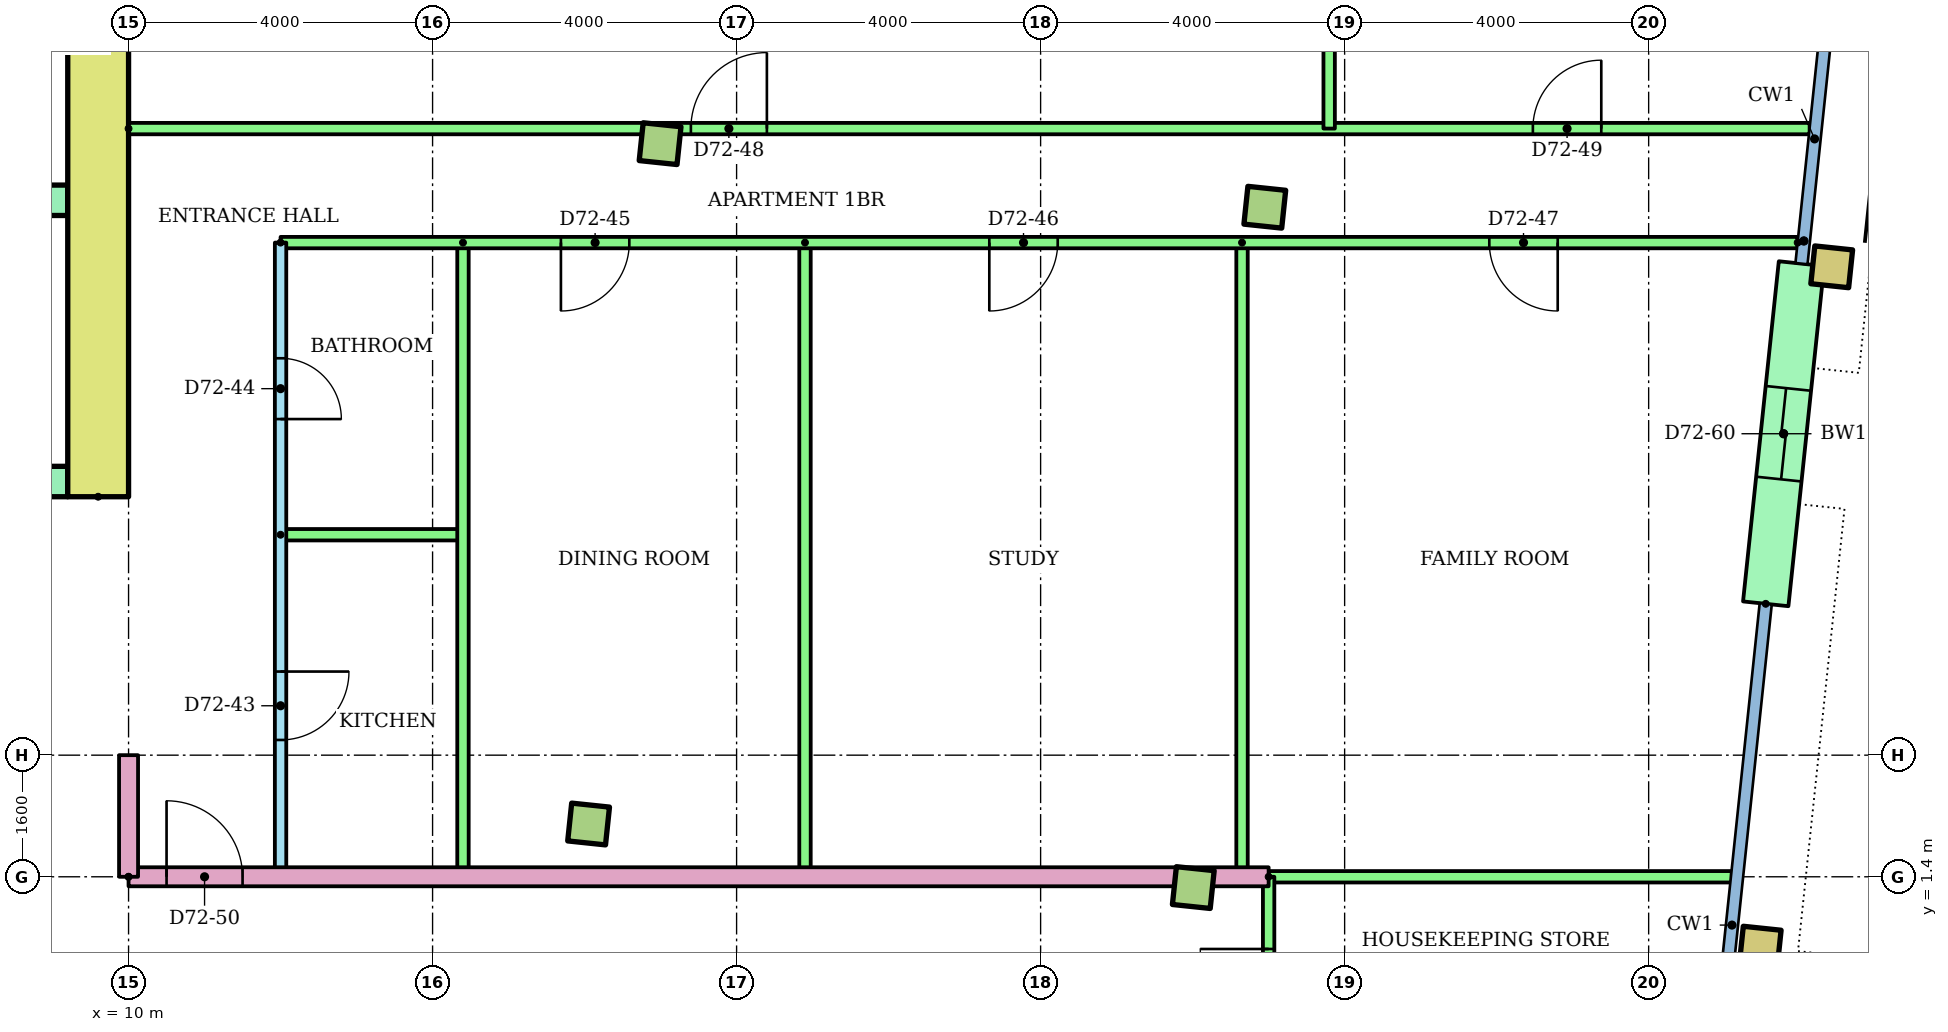
"""IFC4 building model, lengths in metres.
Left out: names, types, materials, properties, quantities, classifications, styles, units other than length and angle.
Written with IfcOpenShell. Run it as: python <this file> out.ifc"""

import sys

from ifc_helpers import new_model, si_unit, direction, frame, frame_2d, origin, origin_2d, place, context, subcontext, project, spatial, rectangle, hollow_rectangle, extrude, element, fill, save


model = new_model("IFC4")
c1 = context("Model", 3, precision=1e-05, world=origin(), true_north=direction((0.0, 1.0)))
c2 = subcontext(c1, "Body", "Model", "MODEL_VIEW")
j1 = project(units=[si_unit("LENGTHUNIT", "METRE"), si_unit("PLANEANGLEUNIT", "RADIAN")], contexts=[c1])
p1 = place(None, origin())
s1 = spatial("IfcSite", under=j1, at=p1, CompositionType="ELEMENT")
p2 = place(p1, origin())
s2 = spatial("IfcBuilding", under=s1, at=p2, CompositionType="ELEMENT")
p3 = place(p2, frame((0.0, 0.0, 275.5)))
s3 = spatial("IfcBuildingStorey", under=s2, at=p3, CompositionType="ELEMENT", Elevation=275.5)
for number, where, z_axis, x_axis in (
    (1, (16.053, 2.094, 0.0), (0.0, 0.0, 1.0), (0.995, -0.105, 0.0)),
    (2, (24.009, 1.258, 0.0), (0.0, 0.0, 1.0), (0.995, -0.105, 0.0)),
):
    element("IfcColumn", number, at=place(p3, frame(where, z_axis=z_axis, x_axis=x_axis)), inside=s3, PredefinedType="COLUMN", context=c2, shape_type="SweptSolid", body=[
        extrude(rectangle(XDim=0.5, YDim=0.5, at=origin_2d()), origin(), (0.0, 0.0, 1.0), 3.2),
    ])
p4 = place(p3, frame((31.468, 0.474, 0.0), z_axis=(0.0, 0.0, 1.0), x_axis=(0.994521895368, -0.104528463268, 0.0)))
e3 = element("IfcColumn", 3, at=p4, inside=s3, PredefinedType="COLUMN", context=c2, shape_type="SweptSolid", body=[
    extrude(hollow_rectangle(XDim=0.5, YDim=0.5, WallThickness=0.025, at=origin_2d()), origin(), (0.0, 0.0, 1.0), 3.2),
])
for number, where, z_axis, x_axis in (
    (4, (16.993, 11.045, 0.0), (0.0, 0.0, 1.0), (0.995, -0.105, 0.0)),
    (5, (24.95, 10.209, 0.0), (0.0, 0.0, 1.0), (0.995, -0.105, 0.0)),
):
    element("IfcColumn", number, at=place(p3, frame(where, z_axis=z_axis, x_axis=x_axis)), inside=s3, PredefinedType="COLUMN", context=c2, shape_type="SweptSolid", body=[
        extrude(rectangle(XDim=0.5, YDim=0.5, at=origin_2d()), origin(), (0.0, 0.0, 1.0), 3.2),
    ])
p5 = place(p3, frame((32.409, 9.425, 0.0), z_axis=(0.0, 0.0, 1.0), x_axis=(0.994521895368, -0.104528463268, 0.0)))
e6 = element("IfcColumn", 6, at=p5, inside=s3, PredefinedType="COLUMN", context=c2, shape_type="SweptSolid", body=[
    extrude(hollow_rectangle(XDim=0.5, YDim=0.5, WallThickness=0.025, at=origin_2d()), origin(), (0.0, 0.0, 1.0), 3.2),
])
p6 = place(p3, frame((31.54, 4.991, 0.0), z_axis=(0.0, 0.0, 1.0), x_axis=(0.104546400045, 0.994520009974, 0.0)))
e7 = element("IfcWall", 7, at=p6, inside=s3, PredefinedType="STANDARD", context=c2, shape_type="SweptSolid", body=[
    extrude(rectangle(XDim=4.5, YDim=0.6, at=frame_2d((2.25, 0.0))), origin(), (0.0, 0.0, 1.0), 2.92),
])
p7 = place(p6, frame((1.65, 0.0, 0.0)))
e8 = element("IfcOpeningElement", 8, at=p7, cuts=e7, PredefinedType="OPENING", context=c2, shape_type="SweptSolid", body=[
    extrude(rectangle(XDim=1.2, YDim=2.1, at=frame_2d((0.6, 1.05))), frame((0.0, 0.31, 0.0), z_axis=(0.0, -1.0, 0.0), x_axis=(1.0, 0.0, 0.0)), (0.0, 0.0, 1.0), 0.62),
])
p8 = place(p3, frame((9.6, 6.4, 0.0), z_axis=(0.0, 0.0, 1.0), x_axis=(0.0, 1.0, 0.0)))
e9 = element("IfcWall", 9, at=p8, inside=s3, PredefinedType="SHEAR", context=c2, shape_type="SweptSolid", body=[
    extrude(rectangle(XDim=13.6, YDim=0.8, at=frame_2d((6.8, 0.0))), origin(), (0.0, 0.0, 1.0), 2.92),
])
p9 = place(p3, frame((-9.2, 6.6, 0.0)))
e10 = element("IfcWall", 10, at=p9, inside=s3, PredefinedType="SHEAR", context=c2, shape_type="SweptSolid", body=[
    extrude(rectangle(XDim=18.4, YDim=0.4, at=frame_2d((9.2, 0.0))), origin(), (0.0, 0.0, 1.0), 2.92),
])
p10 = place(p9, frame((8.3, 0.0, 0.0)))
e11 = element("IfcOpeningElement", 11, at=p10, cuts=e10, PredefinedType="OPENING", context=c2, shape_type="SweptSolid", body=[
    extrude(rectangle(XDim=1.8, YDim=2.1, at=frame_2d((0.9, 1.05))), frame((0.0, 0.21, 0.0), z_axis=(0.0, -1.0, 0.0), x_axis=(1.0, 0.0, 0.0)), (0.0, 0.0, 1.0), 0.42),
])
p11 = place(p9, frame((3.8, 0.0, 0.0)))
e12 = element("IfcOpeningElement", 12, at=p11, cuts=e10, PredefinedType="OPENING", context=c2, shape_type="SweptSolid", body=[
    extrude(rectangle(XDim=1.8, YDim=2.1, at=frame_2d((0.9, 1.05))), frame((0.0, 0.21, 0.0), z_axis=(0.0, -1.0, 0.0), x_axis=(1.0, 0.0, 0.0)), (0.0, 0.0, 1.0), 0.42),
])
p12 = place(p9, frame((12.8, 0.0, 0.0)))
e13 = element("IfcOpeningElement", 13, at=p12, cuts=e10, PredefinedType="OPENING", context=c2, shape_type="SweptSolid", body=[
    extrude(rectangle(XDim=1.8, YDim=2.1, at=frame_2d((0.9, 1.05))), frame((0.0, 0.21, 0.0), z_axis=(0.0, -1.0, 0.0), x_axis=(1.0, 0.0, 0.0)), (0.0, 0.0, 1.0), 0.42),
])
p13 = place(p3, frame((1.2, 10.3, 0.0)))
e14 = element("IfcWall", 14, at=p13, inside=s3, PredefinedType="SHEAR", context=c2, shape_type="SweptSolid", body=[
    extrude(rectangle(XDim=8.0, YDim=0.4, at=frame_2d((4.0, 0.0))), origin(), (0.0, 0.0, 1.0), 2.92),
])
p14 = place(p13, frame((0.817, 0.0, 0.0)))
e15 = element("IfcOpeningElement", 15, at=p14, cuts=e14, PredefinedType="OPENING", context=c2, shape_type="SweptSolid", body=[
    extrude(rectangle(XDim=1.1, YDim=2.1, at=frame_2d((0.55, 1.05))), frame((0.0, 0.21, 0.0), z_axis=(0.0, -1.0, 0.0), x_axis=(1.0, 0.0, 0.0)), (0.0, 0.0, 1.0), 0.42),
])
p15 = place(p13, frame((3.55, 0.0, 0.0)))
e16 = element("IfcOpeningElement", 16, at=p15, cuts=e14, PredefinedType="OPENING", context=c2, shape_type="SweptSolid", body=[
    extrude(rectangle(XDim=1.1, YDim=2.1, at=frame_2d((0.55, 1.05))), frame((0.0, 0.21, 0.0), z_axis=(0.0, -1.0, 0.0), x_axis=(1.0, 0.0, 0.0)), (0.0, 0.0, 1.0), 0.42),
])
p16 = place(p13, frame((6.283, 0.0, 0.0)))
e17 = element("IfcOpeningElement", 17, at=p16, cuts=e14, PredefinedType="OPENING", context=c2, shape_type="SweptSolid", body=[
    extrude(rectangle(XDim=1.1, YDim=2.1, at=frame_2d((0.55, 1.05))), frame((0.0, 0.21, 0.0), z_axis=(0.0, -1.0, 0.0), x_axis=(1.0, 0.0, 0.0)), (0.0, 0.0, 1.0), 0.42),
])
p17 = place(p3, frame((12.0, 9.743, 0.0), z_axis=(0.0, 0.0, 1.0), x_axis=(0.0, -1.0, 0.0)))
e18 = element("IfcWall", 18, at=p17, inside=s3, PredefinedType="PARTITIONING", context=c2, shape_type="SweptSolid", body=[
    extrude(rectangle(XDim=8.344, YDim=0.15, at=frame_2d((4.172, 0.0))), origin(), (0.0, 0.0, 1.0), 2.4),
])
p18 = place(p17, frame((5.643, 0.0, 0.0)))
e19 = element("IfcOpeningElement", 19, at=p18, cuts=e18, PredefinedType="OPENING", context=c2, shape_type="SweptSolid", body=[
    extrude(rectangle(XDim=0.9, YDim=2.1, at=frame_2d((0.45, 1.05))), frame((0.0, 0.085, 0.0), z_axis=(0.0, -1.0, 0.0), x_axis=(1.0, 0.0, 0.0)), (0.0, 0.0, 1.0), 0.17),
])
p19 = place(p17, frame((1.522, 0.0, 0.0)))
e20 = element("IfcOpeningElement", 20, at=p19, cuts=e18, PredefinedType="OPENING", context=c2, shape_type="SweptSolid", body=[
    extrude(rectangle(XDim=0.8, YDim=2.1, at=frame_2d((0.4, 1.05))), frame((0.0, 0.085, 0.0), z_axis=(0.0, -1.0, 0.0), x_axis=(1.0, 0.0, 0.0)), (0.0, 0.0, 1.0), 0.17),
])
p20 = place(p3, frame((12.0, 5.9, 0.0)))
e21 = element("IfcWall", 21, at=p20, inside=s3, PredefinedType="PARTITIONING", context=c2, shape_type="SweptSolid", body=[
    extrude(rectangle(XDim=2.4, YDim=0.15, at=frame_2d((1.2, 0.0))), origin(), (0.0, 0.0, 1.0), 2.4),
])
for number, where, z_axis, x_axis in (
    (22, (14.4, 9.743, 0.0), (0.0, 0.0, 1.0), (0.0, -1.0, 0.0)),
    (23, (18.9, 9.743, 0.0), (0.0, 0.0, 1.0), (0.0, -1.0, 0.0)),
    (24, (24.65, 9.743, 0.0), (0.0, 0.0, 1.0), (0.0, -1.0, 0.0)),
):
    element("IfcWall", number, at=place(p3, frame(where, z_axis=z_axis, x_axis=x_axis)), inside=s3, PredefinedType="PARTITIONING", context=c2, shape_type="SweptSolid", body=[
        extrude(rectangle(XDim=8.344, YDim=0.15, at=frame_2d((4.172, 0.0))), origin(), (0.0, 0.0, 1.0), 2.4),
    ])
p21 = place(p3, frame((31.96, 9.743, 0.0), z_axis=(0.0, 0.0, 1.0), x_axis=(-1.0, 0.0, 0.0)))
e25 = element("IfcWall", 25, at=p21, inside=s3, PredefinedType="PARTITIONING", context=c2, shape_type="SweptSolid", body=[
    extrude(rectangle(XDim=19.96, YDim=0.15, at=frame_2d((9.98, 0.0))), origin(), (0.0, 0.0, 1.0), 2.4),
])
p22 = place(p21, frame((15.372, 0.0, 0.0)))
e26 = element("IfcOpeningElement", 26, at=p22, cuts=e25, PredefinedType="OPENING", context=c2, shape_type="SweptSolid", body=[
    extrude(rectangle(XDim=0.9, YDim=2.1, at=frame_2d((0.45, 1.05))), frame((0.0, 0.085, 0.0), z_axis=(0.0, -1.0, 0.0), x_axis=(1.0, 0.0, 0.0)), (0.0, 0.0, 1.0), 0.17),
])
p23 = place(p21, frame((9.735, 0.0, 0.0)))
e27 = element("IfcOpeningElement", 27, at=p23, cuts=e25, PredefinedType="OPENING", context=c2, shape_type="SweptSolid", body=[
    extrude(rectangle(XDim=0.9, YDim=2.1, at=frame_2d((0.45, 1.05))), frame((0.0, 0.085, 0.0), z_axis=(0.0, -1.0, 0.0), x_axis=(1.0, 0.0, 0.0)), (0.0, 0.0, 1.0), 0.17),
])
p24 = place(p21, frame((3.157, 0.0, 0.0)))
e28 = element("IfcOpeningElement", 28, at=p24, cuts=e25, PredefinedType="OPENING", context=c2, shape_type="SweptSolid", body=[
    extrude(rectangle(XDim=0.9, YDim=2.1, at=frame_2d((0.45, 1.05))), frame((0.0, 0.085, 0.0), z_axis=(0.0, -1.0, 0.0), x_axis=(1.0, 0.0, 0.0)), (0.0, 0.0, 1.0), 0.17),
])
p25 = place(p3, frame((10.0, 11.243, 0.0)))
e29 = element("IfcWall", 29, at=p25, inside=s3, PredefinedType="PARTITIONING", context=c2, shape_type="SweptSolid", body=[
    extrude(rectangle(XDim=22.118, YDim=0.15, at=frame_2d((11.059, 0.0))), origin(), (0.0, 0.0, 1.0), 2.4),
])
p26 = place(p25, frame((7.398, 0.0, 0.0)))
e30 = element("IfcOpeningElement", 30, at=p26, cuts=e29, PredefinedType="OPENING", context=c2, shape_type="SweptSolid", body=[
    extrude(rectangle(XDim=1.0, YDim=2.1, at=frame_2d((0.5, 1.05))), frame((0.0, 0.085, 0.0), z_axis=(0.0, -1.0, 0.0), x_axis=(1.0, 0.0, 0.0)), (0.0, 0.0, 1.0), 0.17),
])
p27 = place(p25, frame((18.477, 0.0, 0.0)))
e31 = element("IfcOpeningElement", 31, at=p27, cuts=e29, PredefinedType="OPENING", context=c2, shape_type="SweptSolid", body=[
    extrude(rectangle(XDim=0.9, YDim=2.1, at=frame_2d((0.45, 1.05))), frame((0.0, 0.085, 0.0), z_axis=(0.0, -1.0, 0.0), x_axis=(1.0, 0.0, 0.0)), (0.0, 0.0, 1.0), 0.17),
])
p28 = place(p3, frame((25.796, 18.185, 0.0), z_axis=(0.0, 0.0, 1.0), x_axis=(0.0, -1.0, 0.0)))
e32 = element("IfcWall", 32, at=p28, inside=s3, PredefinedType="PARTITIONING", context=c2, shape_type="SweptSolid", body=[
    extrude(rectangle(XDim=6.941, YDim=0.15, at=frame_2d((3.471, 0.0))), origin(), (0.0, 0.0, 1.0), 2.4),
])
p29 = place(p3, frame((10.0, 1.4, 0.0)))
e33 = element("IfcWall", 33, at=p29, inside=s3, PredefinedType="PARTITIONING", context=c2, shape_type="SweptSolid", body=[
    extrude(rectangle(XDim=15.0, YDim=0.25, at=frame_2d((7.5, 0.0))), origin(), (0.0, 0.0, 1.0), 2.4),
])
p30 = place(p29, frame((0.5, 0.0, 0.0)))
e34 = element("IfcOpeningElement", 34, at=p30, cuts=e33, PredefinedType="OPENING", context=c2, shape_type="SweptSolid", body=[
    extrude(rectangle(XDim=1.0, YDim=2.1, at=frame_2d((0.5, 1.05))), frame((0.0, 0.135, 0.0), z_axis=(0.0, -1.0, 0.0), x_axis=(1.0, 0.0, 0.0)), (0.0, 0.0, 1.0), 0.27),
])
p31 = place(p3, frame((25.0, 1.4, 0.0)))
e35 = element("IfcWall", 35, at=p31, inside=s3, PredefinedType="PARTITIONING", context=c2, shape_type="SweptSolid", body=[
    extrude(rectangle(XDim=6.093, YDim=0.15, at=frame_2d((3.046, 0.0))), origin(), (0.0, 0.0, 1.0), 2.4),
])
p32 = place(p3, frame((25.0, -1.4, 0.0), z_axis=(0.0, 0.0, 1.0), x_axis=(0.0, 1.0, 0.0)))
e36 = element("IfcWall", 36, at=p32, inside=s3, PredefinedType="PARTITIONING", context=c2, shape_type="SweptSolid", body=[
    extrude(rectangle(XDim=2.8, YDim=0.15, at=frame_2d((1.4, 0.0))), origin(), (0.0, 0.0, 1.0), 2.4),
])
p33 = place(p32, frame((0.95, 0.0, 0.0)))
e37 = element("IfcOpeningElement", 37, at=p33, cuts=e36, PredefinedType="OPENING", context=c2, shape_type="SweptSolid", body=[
    extrude(rectangle(XDim=0.9, YDim=2.1, at=frame_2d((0.45, 1.05))), frame((0.0, 0.085, 0.0), z_axis=(0.0, -1.0, 0.0), x_axis=(1.0, 0.0, 0.0)), (0.0, 0.0, 1.0), 0.17),
])
p34 = place(p3, frame((10.0, 1.4, 0.0), z_axis=(0.0, 0.0, 1.0), x_axis=(0.0, 1.0, 0.0)))
e38 = element("IfcWall", 38, at=p34, inside=s3, PredefinedType="PARTITIONING", context=c2, shape_type="SweptSolid", body=[
    extrude(rectangle(XDim=1.6, YDim=0.25, at=frame_2d((0.8, 0.0))), origin(), (0.0, 0.0, 1.0), 2.4),
])
p35 = place(p18, origin())
e39 = element("IfcDoor", 39, at=p35, inside=s3, OperationType="SINGLE_SWING_LEFT", PredefinedType="DOOR", context=c2, shape_type="SweptSolid", body=[
    extrude(rectangle(XDim=0.9, YDim=2.1, at=frame_2d((0.45, 1.05))), frame((0.0, 0.025, 0.0), z_axis=(0.0, -1.0, 0.0), x_axis=(1.0, 0.0, 0.0)), (0.0, 0.0, 1.0), 0.05),
])
fill(e19, e39)
p36 = place(p19, origin())
e40 = element("IfcDoor", 40, at=p36, inside=s3, OperationType="SINGLE_SWING_RIGHT", PredefinedType="DOOR", context=c2, shape_type="SweptSolid", body=[
    extrude(rectangle(XDim=0.8, YDim=2.1, at=frame_2d((0.4, 1.05))), frame((0.0, 0.025, 0.0), z_axis=(0.0, -1.0, 0.0), x_axis=(1.0, 0.0, 0.0)), (0.0, 0.0, 1.0), 0.05),
])
fill(e20, e40)
p37 = place(p22, origin())
e41 = element("IfcDoor", 41, at=p37, inside=s3, OperationType="SINGLE_SWING_RIGHT", PredefinedType="DOOR", context=c2, shape_type="SweptSolid", body=[
    extrude(rectangle(XDim=0.9, YDim=2.1, at=frame_2d((0.45, 1.05))), frame((0.0, 0.025, 0.0), z_axis=(0.0, -1.0, 0.0), x_axis=(1.0, 0.0, 0.0)), (0.0, 0.0, 1.0), 0.05),
])
fill(e26, e41)
p38 = place(p23, origin())
e42 = element("IfcDoor", 42, at=p38, inside=s3, OperationType="SINGLE_SWING_RIGHT", PredefinedType="DOOR", context=c2, shape_type="SweptSolid", body=[
    extrude(rectangle(XDim=0.9, YDim=2.1, at=frame_2d((0.45, 1.05))), frame((0.0, 0.025, 0.0), z_axis=(0.0, -1.0, 0.0), x_axis=(1.0, 0.0, 0.0)), (0.0, 0.0, 1.0), 0.05),
])
fill(e27, e42)
p39 = place(p24, origin())
e43 = element("IfcDoor", 43, at=p39, inside=s3, OperationType="SINGLE_SWING_LEFT", PredefinedType="DOOR", context=c2, shape_type="SweptSolid", body=[
    extrude(rectangle(XDim=0.9, YDim=2.1, at=frame_2d((0.45, 1.05))), frame((0.0, 0.025, 0.0), z_axis=(0.0, -1.0, 0.0), x_axis=(1.0, 0.0, 0.0)), (0.0, 0.0, 1.0), 0.05),
])
fill(e28, e43)
p40 = place(p26, origin())
e44 = element("IfcDoor", 44, at=p40, inside=s3, OperationType="SINGLE_SWING_RIGHT", PredefinedType="DOOR", context=c2, shape_type="SweptSolid", body=[
    extrude(rectangle(XDim=1.0, YDim=2.1, at=frame_2d((0.5, 1.05))), frame((0.0, 0.025, 0.0), z_axis=(0.0, -1.0, 0.0), x_axis=(1.0, 0.0, 0.0)), (0.0, 0.0, 1.0), 0.05),
])
fill(e30, e44)
p41 = place(p27, origin())
e45 = element("IfcDoor", 45, at=p41, inside=s3, OperationType="SINGLE_SWING_RIGHT", PredefinedType="DOOR", context=c2, shape_type="SweptSolid", body=[
    extrude(rectangle(XDim=0.9, YDim=2.1, at=frame_2d((0.45, 1.05))), frame((0.0, 0.025, 0.0), z_axis=(0.0, -1.0, 0.0), x_axis=(1.0, 0.0, 0.0)), (0.0, 0.0, 1.0), 0.05),
])
fill(e31, e45)
p42 = place(p30, origin())
e46 = element("IfcDoor", 46, at=p42, inside=s3, OperationType="SINGLE_SWING_LEFT", PredefinedType="DOOR", context=c2, shape_type="SweptSolid", body=[
    extrude(rectangle(XDim=1.0, YDim=2.1, at=frame_2d((0.5, 1.05))), frame((0.0, 0.025, 0.0), z_axis=(0.0, -1.0, 0.0), x_axis=(1.0, 0.0, 0.0)), (0.0, 0.0, 1.0), 0.05),
])
fill(e34, e46)
p43 = place(p33, origin())
e47 = element("IfcDoor", 47, at=p43, inside=s3, OperationType="SINGLE_SWING_RIGHT", PredefinedType="DOOR", context=c2, shape_type="SweptSolid", body=[
    extrude(rectangle(XDim=0.9, YDim=2.1, at=frame_2d((0.45, 1.05))), frame((0.0, 0.025, 0.0), z_axis=(0.0, -1.0, 0.0), x_axis=(1.0, 0.0, 0.0)), (0.0, 0.0, 1.0), 0.05),
])
fill(e37, e47)
p44 = place(p7, origin())
e48 = element("IfcDoor", 48, at=p44, inside=s3, OperationType="SLIDING_TO_LEFT", PredefinedType="DOOR", context=c2, shape_type="SweptSolid", body=[
    extrude(rectangle(XDim=1.2, YDim=2.1, at=frame_2d((0.6, 1.05))), frame((0.0, 0.025, 0.0), z_axis=(0.0, -1.0, 0.0), x_axis=(1.0, 0.0, 0.0)), (0.0, 0.0, 1.0), 0.05),
])
fill(e8, e48)
save(model, sys.argv[1])
